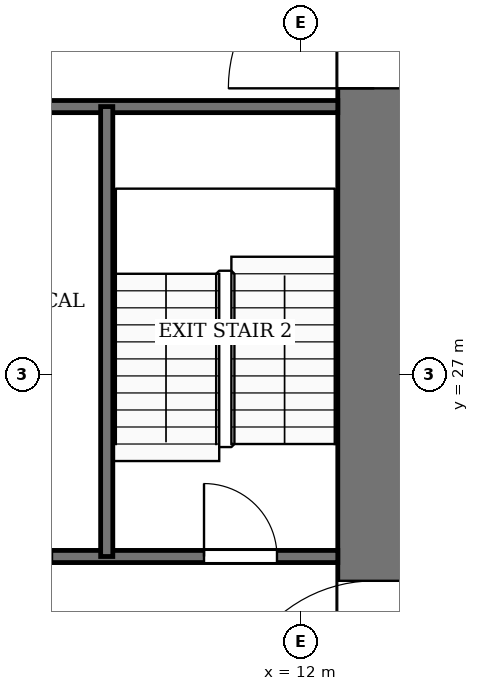
"""IFC4 building model, lengths in metres.
Left out: names, types, materials, properties, quantities, classifications, styles, units other than length and angle.
Written with IfcOpenShell. Run it as: python <this file> out.ifc"""

import sys

from ifc_helpers import new_model, si_unit, direction, frame, frame_2d, origin, place, context, subcontext, project, spatial, rectangle, extrude, element, fill, save


model = new_model("IFC4")
c1 = context("Model", 3, precision=1e-05, world=origin(), true_north=direction((0.0, 1.0)))
c2 = subcontext(c1, "Body", "Model", "MODEL_VIEW")
j1 = project(units=[si_unit("LENGTHUNIT", "METRE"), si_unit("PLANEANGLEUNIT", "RADIAN")], contexts=[c1])
p1 = place(None, origin())
s1 = spatial("IfcSite", under=j1, at=p1, CompositionType="ELEMENT")
p2 = place(p1, origin())
s2 = spatial("IfcBuilding", under=s1, at=p2, CompositionType="ELEMENT")
p3 = place(p2, frame((0.0, 0.0, 90.0)))
s3 = spatial("IfcBuildingStorey", under=s2, at=p3, CompositionType="ELEMENT", Elevation=90.0)
p4 = place(p3, frame((13.2, 18.4, -0.13), z_axis=(0.0, 0.0, 1.0), x_axis=(0.0, 1.0, 0.0)))
e1 = element("IfcWall", 1, at=p4, inside=s3, PredefinedType="SHEAR", context=c2, shape_type="SweptSolid", body=[
    extrude(rectangle(XDim=19.2, YDim=1.2, at=frame_2d((9.6, 0.0))), origin(), (0.0, 0.0, 1.0), 4.0),
])
p5 = place(p4, frame((2.8, 0.0, 0.13)))
e2 = element("IfcOpeningElement", 2, at=p5, cuts=e1, PredefinedType="OPENING", context=c2, shape_type="SweptSolid", body=[
    extrude(rectangle(XDim=2.4, YDim=2.4, at=frame_2d((1.2, 1.2))), frame((0.0, 0.61, 0.0), z_axis=(0.0, -1.0, 0.0), x_axis=(1.0, 0.0, 0.0)), (0.0, 0.0, 1.0), 1.22),
])
p6 = place(p4, frame((13.3, 0.0, 0.13)))
e3 = element("IfcOpeningElement", 3, at=p6, cuts=e1, PredefinedType="OPENING", context=c2, shape_type="SweptSolid", body=[
    extrude(rectangle(XDim=2.4, YDim=2.4, at=frame_2d((1.2, 1.2))), frame((0.0, 0.61, 0.0), z_axis=(0.0, -1.0, 0.0), x_axis=(1.0, 0.0, 0.0)), (0.0, 0.0, 1.0), 1.22),
])
p7 = place(p3, frame((6.0, 24.0, 0.0), z_axis=(0.0, 0.0, 1.0), x_axis=(1.0, 0.0, 0.0)))
e4 = element("IfcWall", 4, at=p7, inside=s3, PredefinedType="PARTITIONING", context=c2, shape_type="SweptSolid", body=[
    extrude(rectangle(XDim=6.6, YDim=0.2, at=frame_2d((3.3, 0.0))), origin(), (0.0, 0.0, 1.0), 3.87),
])
p8 = place(p7, frame((0.9, 0.0, 0.0)))
e5 = element("IfcOpeningElement", 5, at=p8, cuts=e4, PredefinedType="OPENING", context=c2, shape_type="SweptSolid", body=[
    extrude(rectangle(XDim=1.0, YDim=2.1, at=frame_2d((0.5, 1.05))), frame((0.0, 0.11, 0.0), z_axis=(0.0, -1.0, 0.0), x_axis=(1.0, 0.0, 0.0)), (0.0, 0.0, 1.0), 0.22),
])
p9 = place(p7, frame((4.4, 0.0, 0.0)))
e6 = element("IfcOpeningElement", 6, at=p9, cuts=e4, PredefinedType="OPENING", context=c2, shape_type="SweptSolid", body=[
    extrude(rectangle(XDim=1.2, YDim=2.2, at=frame_2d((0.6, 1.1))), frame((0.0, 0.11, 0.0), z_axis=(0.0, -1.0, 0.0), x_axis=(1.0, 0.0, 0.0)), (0.0, 0.0, 1.0), 0.22),
])
p10 = place(p3, frame((6.0, 31.4, 0.0), z_axis=(0.0, 0.0, 1.0), x_axis=(1.0, 0.0, 0.0)))
e7 = element("IfcWall", 7, at=p10, inside=s3, PredefinedType="PARTITIONING", context=c2, shape_type="SweptSolid", body=[
    extrude(rectangle(XDim=6.6, YDim=0.2, at=frame_2d((3.3, 0.0))), origin(), (0.0, 0.0, 1.0), 3.87),
])
p11 = place(p3, frame((8.8, 24.0, 0.0), z_axis=(0.0, 0.0, 1.0), x_axis=(0.0, 1.0, 0.0)))
e8 = element("IfcWall", 8, at=p11, inside=s3, PredefinedType="PARTITIONING", context=c2, shape_type="SweptSolid", body=[
    extrude(rectangle(XDim=7.4, YDim=0.2, at=frame_2d((3.7, 0.0))), origin(), (0.0, 0.0, 1.0), 3.87),
])
p12 = place(p9, origin())
e9 = element("IfcDoor", 9, at=p12, inside=s3, OperationType="SINGLE_SWING_LEFT", PredefinedType="DOOR", context=c2, shape_type="SweptSolid", body=[
    extrude(rectangle(XDim=1.2, YDim=2.2, at=frame_2d((0.6, 1.1))), frame((0.0, 0.025, 0.0), z_axis=(0.0, -1.0, 0.0), x_axis=(1.0, 0.0, 0.0)), (0.0, 0.0, 1.0), 0.05),
])
fill(e6, e9)
p13 = place(p5, origin())
e10 = element("IfcDoor", 10, at=p13, inside=s3, OperationType="DOUBLE_DOOR_SINGLE_SWING", PredefinedType="DOOR", context=c2, shape_type="SweptSolid", body=[
    extrude(rectangle(XDim=2.4, YDim=2.4, at=frame_2d((1.2, 1.2))), frame((0.0, 0.025, 0.0), z_axis=(0.0, -1.0, 0.0), x_axis=(1.0, 0.0, 0.0)), (0.0, 0.0, 1.0), 0.05),
])
fill(e2, e10)
p14 = place(p6, origin())
e11 = element("IfcDoor", 11, at=p14, inside=s3, OperationType="DOUBLE_DOOR_SINGLE_SWING", PredefinedType="DOOR", context=c2, shape_type="SweptSolid", body=[
    extrude(rectangle(XDim=2.4, YDim=2.4, at=frame_2d((1.2, 1.2))), frame((0.0, 0.025, 0.0), z_axis=(0.0, -1.0, 0.0), x_axis=(1.0, 0.0, 0.0)), (0.0, 0.0, 1.0), 0.05),
])
fill(e3, e11)
save(model, sys.argv[1])
